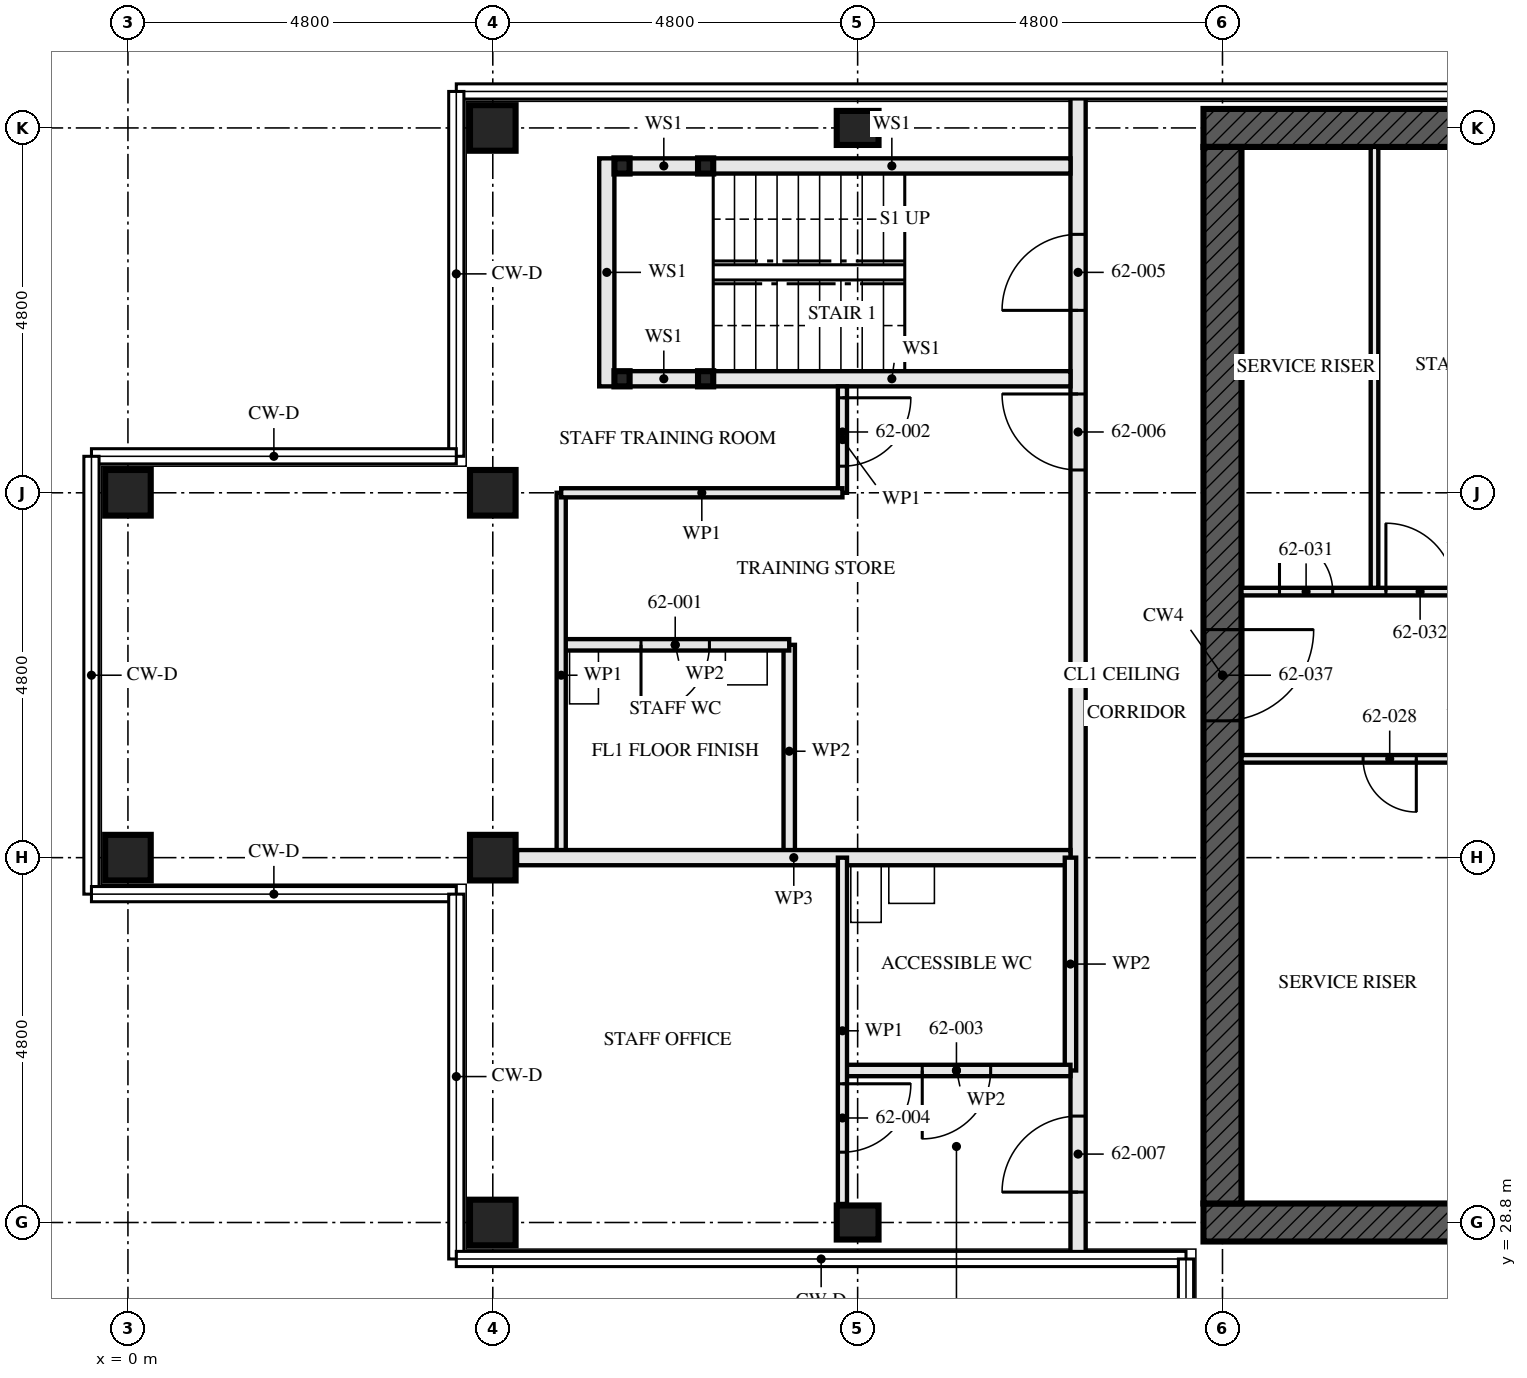
"""IFC4 building model, lengths in metres.
Left out: names, types, materials, properties, quantities, classifications, styles, units other than length and angle.
Written with IfcOpenShell. Run it as: python <this file> out.ifc"""

import sys

from ifc_helpers import new_model, si_unit, direction, frame, frame_2d, origin, origin_2d, place, context, subcontext, project, spatial, rectangle, hollow_rectangle, i_section, extrude, element, fill, save


model = new_model("IFC4")
c1 = context("Model", 3, precision=1e-05, world=origin(), true_north=direction((0.0, 1.0)))
c2 = subcontext(c1, "Body", "Model", "MODEL_VIEW")
j1 = project(units=[si_unit("LENGTHUNIT", "METRE"), si_unit("PLANEANGLEUNIT", "RADIAN")], contexts=[c1])
p1 = place(None, origin())
s1 = spatial("IfcSite", under=j1, at=p1, CompositionType="ELEMENT")
p2 = place(p1, origin())
s2 = spatial("IfcBuilding", under=s1, at=p2, CompositionType="ELEMENT")
p3 = place(p2, frame((0.0, 0.0, 226.0)))
s3 = spatial("IfcBuildingStorey", under=s2, at=p3, CompositionType="ELEMENT", Elevation=226.0)
for number, where, z_axis, x_axis in (
    (1, (0.0, 33.6, 0.0), (0.0, 0.0, 1.0), (0.0, 1.0, 0.0)),
    (2, (0.0, 38.4, 0.0), (0.0, 0.0, 1.0), (0.0, 1.0, 0.0)),
    (3, (4.8, 28.8, 0.0), (0.0, 0.0, 1.0), (0.0, 1.0, 0.0)),
    (4, (4.8, 33.6, 0.0), (0.0, 0.0, 1.0), (0.0, 1.0, 0.0)),
    (5, (4.8, 38.4, 0.0), (0.0, 0.0, 1.0), (0.0, 1.0, 0.0)),
    (6, (4.8, 43.2, 0.0), (0.0, 0.0, 1.0), (0.0, 1.0, 0.0)),
):
    element("IfcColumn", number, at=place(p3, frame(where, z_axis=z_axis, x_axis=x_axis)), inside=s3, PredefinedType="COLUMN", context=c2, shape_type="SweptSolid", body=[
        extrude(hollow_rectangle(XDim=0.6, YDim=0.6, WallThickness=0.05, at=origin_2d()), origin(), (0.0, 0.0, 1.0), 3.5),
    ])
for number, where, z_axis, x_axis in (
    (7, (9.6, 28.8, 0.0), (0.0, 0.0, 1.0), (0.0, 1.0, 0.0)),
    (8, (9.6, 43.2, 0.0), (0.0, 0.0, 1.0), (0.0, 1.0, 0.0)),
):
    element("IfcColumn", number, at=place(p3, frame(where, z_axis=z_axis, x_axis=x_axis)), inside=s3, PredefinedType="COLUMN", context=c2, shape_type="SweptSolid", body=[
        extrude(i_section(OverallWidth=0.448, OverallDepth=0.55, WebThickness=0.072, FlangeThickness=0.115, FilletRadius=0.015, at=origin_2d()), origin(), (0.0, 0.0, 1.0), 3.5),
    ])
p4 = place(p3, frame((14.15, 28.8, -0.17), z_axis=(0.0, 0.0, 1.0), x_axis=(1.0, 0.0, 0.0)))
e9 = element("IfcWall", 9, at=p4, inside=s3, PredefinedType="SHEAR", context=c2, shape_type="SweptSolid", body=[
    extrude(rectangle(XDim=14.9, YDim=0.5, at=frame_2d((7.45, 0.0))), origin(), (0.0, 0.0, 1.0), 3.5),
])
p5 = place(p4, frame((6.85, 0.0, 0.17)))
e10 = element("IfcOpeningElement", 10, at=p5, cuts=e9, PredefinedType="OPENING", context=c2, shape_type="SweptSolid", body=[
    extrude(rectangle(XDim=1.2, YDim=2.1, at=frame_2d((0.6, 1.05))), frame((0.0, 0.26, 0.0), z_axis=(0.0, -1.0, 0.0), x_axis=(1.0, 0.0, 0.0)), (0.0, 0.0, 1.0), 0.521),
])
p6 = place(p3, frame((29.05, 43.2, -0.17), z_axis=(0.0, 0.0, 1.0), x_axis=(-1.0, 0.0, 0.0)))
e11 = element("IfcWall", 11, at=p6, inside=s3, PredefinedType="SHEAR", context=c2, shape_type="SweptSolid", body=[
    extrude(rectangle(XDim=14.9, YDim=0.5, at=frame_2d((7.45, 0.0))), origin(), (0.0, 0.0, 1.0), 3.5),
])
p7 = place(p3, frame((14.4, 42.95, -0.17), z_axis=(0.0, 0.0, 1.0), x_axis=(0.0, -1.0, 0.0)))
e12 = element("IfcWall", 12, at=p7, inside=s3, PredefinedType="SHEAR", context=c2, shape_type="SweptSolid", body=[
    extrude(rectangle(XDim=13.9, YDim=0.5, at=frame_2d((6.95, 0.0))), origin(), (0.0, 0.0, 1.0), 3.5),
])
p8 = place(p7, frame((6.35, 0.0, 0.17)))
e13 = element("IfcOpeningElement", 13, at=p8, cuts=e12, PredefinedType="OPENING", context=c2, shape_type="SweptSolid", body=[
    extrude(rectangle(XDim=1.2, YDim=2.1, at=frame_2d((0.6, 1.05))), frame((0.0, 0.26, 0.0), z_axis=(0.0, -1.0, 0.0), x_axis=(1.0, 0.0, 0.0)), (0.0, 0.0, 1.0), 0.521),
])
for number, where, z_axis, x_axis in (
    (14, (6.5, 42.7, 0.0), (0.0, 0.0, 1.0), (1.0, 0.0, 0.0)),
    (15, (6.5, 39.9, 0.0), (0.0, 0.0, 1.0), (1.0, 0.0, 0.0)),
    (16, (7.6, 42.7, 0.0), (0.0, 0.0, 1.0), (1.0, 0.0, 0.0)),
    (17, (7.6, 39.9, 0.0), (0.0, 0.0, 1.0), (1.0, 0.0, 0.0)),
):
    element("IfcColumn", number, at=place(p3, frame(where, z_axis=z_axis, x_axis=x_axis)), inside=s3, PredefinedType="COLUMN", context=c2, shape_type="SweptSolid", body=[
        extrude(hollow_rectangle(XDim=0.2, YDim=0.2, WallThickness=0.008, at=origin_2d()), origin(), (0.0, 0.0, 1.0), 3.33),
    ])
p9 = place(p3, frame((6.6, 42.7, 0.0), z_axis=(0.0, 0.0, 1.0), x_axis=(1.0, 0.0, 0.0)))
e18 = element("IfcWall", 18, at=p9, inside=s3, PredefinedType="SOLIDWALL", context=c2, shape_type="SweptSolid", body=[
    extrude(rectangle(XDim=0.9, YDim=0.2, at=frame_2d((0.45, 0.0))), origin(), (0.0, 0.0, 1.0), 2.99),
])
p10 = place(p3, frame((7.7, 42.7, 0.0), z_axis=(0.0, 0.0, 1.0), x_axis=(1.0, 0.0, 0.0)))
e19 = element("IfcWall", 19, at=p10, inside=s3, PredefinedType="SOLIDWALL", context=c2, shape_type="SweptSolid", body=[
    extrude(rectangle(XDim=4.7, YDim=0.2, at=frame_2d((2.35, 0.0))), origin(), (0.0, 0.0, 1.0), 2.99),
])
p11 = place(p3, frame((6.6, 39.9, 0.0), z_axis=(0.0, 0.0, 1.0), x_axis=(1.0, 0.0, 0.0)))
e20 = element("IfcWall", 20, at=p11, inside=s3, PredefinedType="SOLIDWALL", context=c2, shape_type="SweptSolid", body=[
    extrude(rectangle(XDim=0.9, YDim=0.2, at=frame_2d((0.45, 0.0))), origin(), (0.0, 0.0, 1.0), 2.99),
])
p12 = place(p3, frame((7.7, 39.9, 0.0), z_axis=(0.0, 0.0, 1.0), x_axis=(1.0, 0.0, 0.0)))
e21 = element("IfcWall", 21, at=p12, inside=s3, PredefinedType="SOLIDWALL", context=c2, shape_type="SweptSolid", body=[
    extrude(rectangle(XDim=4.7, YDim=0.2, at=frame_2d((2.35, 0.0))), origin(), (0.0, 0.0, 1.0), 2.99),
])
p13 = place(p3, frame((6.3, 42.8, 0.0), z_axis=(0.0, 0.0, 1.0), x_axis=(0.0, -1.0, 0.0)))
e22 = element("IfcWall", 22, at=p13, inside=s3, PredefinedType="SOLIDWALL", context=c2, shape_type="SweptSolid", body=[
    extrude(rectangle(XDim=3.0, YDim=0.2, at=frame_2d((1.5, 0.0))), origin(), (0.0, 0.0, 1.0), 3.33),
])
p14 = place(p3, frame((5.7, 36.4, 0.0), z_axis=(0.0, 0.0, 1.0), x_axis=(1.0, 0.0, 0.0)))
e23 = element("IfcWall", 23, at=p14, inside=s3, PredefinedType="PARTITIONING", context=c2, shape_type="SweptSolid", body=[
    extrude(rectangle(XDim=3.0, YDim=0.15, at=frame_2d((1.5, 0.0))), origin(), (0.0, 0.0, 1.0), 3.33),
])
p15 = place(p14, frame((1.05, 0.0, 0.0)))
e24 = element("IfcOpeningElement", 24, at=p15, cuts=e23, PredefinedType="OPENING", context=c2, shape_type="SweptSolid", body=[
    extrude(rectangle(XDim=0.9, YDim=2.1, at=frame_2d((0.45, 1.05))), frame((0.0, 0.085, 0.0), z_axis=(0.0, -1.0, 0.0), x_axis=(1.0, 0.0, 0.0)), (0.0, 0.0, 1.0), 0.171),
])
p16 = place(p3, frame((8.7, 36.4, 0.0), z_axis=(0.0, 0.0, 1.0), x_axis=(0.0, -1.0, 0.0)))
e25 = element("IfcWall", 25, at=p16, inside=s3, PredefinedType="PARTITIONING", context=c2, shape_type="SweptSolid", body=[
    extrude(rectangle(XDim=2.8, YDim=0.15, at=frame_2d((1.4, 0.0))), origin(), (0.0, 0.0, 1.0), 3.33),
])
p17 = place(p3, frame((9.4, 39.8, 0.0), z_axis=(0.0, 0.0, 1.0), x_axis=(0.0, -1.0, 0.0)))
e26 = element("IfcWall", 26, at=p17, inside=s3, PredefinedType="PARTITIONING", context=c2, shape_type="SweptSolid", body=[
    extrude(rectangle(XDim=1.4, YDim=0.12, at=frame_2d((0.7, 0.0))), origin(), (0.0, 0.0, 1.0), 3.33),
])
p18 = place(p17, frame((0.15, 0.0, 0.0)))
e27 = element("IfcOpeningElement", 27, at=p18, cuts=e26, PredefinedType="OPENING", context=c2, shape_type="SweptSolid", body=[
    extrude(rectangle(XDim=0.9, YDim=2.1, at=frame_2d((0.45, 1.05))), frame((0.0, 0.071, 0.0), z_axis=(0.0, -1.0, 0.0), x_axis=(1.0, 0.0, 0.0)), (0.0, 0.0, 1.0), 0.141),
])
p19 = place(p3, frame((5.7, 38.4, 0.0), z_axis=(0.0, 0.0, 1.0), x_axis=(0.0, -1.0, 0.0)))
e28 = element("IfcWall", 28, at=p19, inside=s3, PredefinedType="PARTITIONING", context=c2, shape_type="SweptSolid", body=[
    extrude(rectangle(XDim=4.8, YDim=0.12, at=frame_2d((2.4, 0.0))), origin(), (0.0, 0.0, 1.0), 3.33),
])
p20 = place(p3, frame((5.7, 38.4, 0.0), z_axis=(0.0, 0.0, 1.0), x_axis=(1.0, 0.0, 0.0)))
e29 = element("IfcWall", 29, at=p20, inside=s3, PredefinedType="PARTITIONING", context=c2, shape_type="SweptSolid", body=[
    extrude(rectangle(XDim=3.7, YDim=0.12, at=frame_2d((1.85, 0.0))), origin(), (0.0, 0.0, 1.0), 2.55),
])
p21 = place(p3, frame((5.12, 33.6, 0.0), z_axis=(0.0, 0.0, 1.0), x_axis=(1.0, 0.0, 0.0)))
e30 = element("IfcWall", 30, at=p21, inside=s3, PredefinedType="PARTITIONING", context=c2, shape_type="SweptSolid", body=[
    extrude(rectangle(XDim=7.28, YDim=0.2, at=frame_2d((3.64, 0.0))), origin(), (0.0, 0.0, 1.0), 2.55),
])
p22 = place(p3, frame((9.4, 30.8, 0.0), z_axis=(0.0, 0.0, 1.0), x_axis=(1.0, 0.0, 0.0)))
e31 = element("IfcWall", 31, at=p22, inside=s3, PredefinedType="PARTITIONING", context=c2, shape_type="SweptSolid", body=[
    extrude(rectangle(XDim=3.0, YDim=0.15, at=frame_2d((1.5, 0.0))), origin(), (0.0, 0.0, 1.0), 3.33),
])
p23 = place(p22, frame((1.05, 0.0, 0.0)))
e32 = element("IfcOpeningElement", 32, at=p23, cuts=e31, PredefinedType="OPENING", context=c2, shape_type="SweptSolid", body=[
    extrude(rectangle(XDim=0.9, YDim=2.1, at=frame_2d((0.45, 1.05))), frame((0.0, 0.085, 0.0), z_axis=(0.0, -1.0, 0.0), x_axis=(1.0, 0.0, 0.0)), (0.0, 0.0, 1.0), 0.171),
])
p24 = place(p3, frame((12.4, 33.6, 0.0), z_axis=(0.0, 0.0, 1.0), x_axis=(0.0, -1.0, 0.0)))
e33 = element("IfcWall", 33, at=p24, inside=s3, PredefinedType="PARTITIONING", context=c2, shape_type="SweptSolid", body=[
    extrude(rectangle(XDim=2.8, YDim=0.15, at=frame_2d((1.4, 0.0))), origin(), (0.0, 0.0, 1.0), 3.33),
])
p25 = place(p3, frame((9.4, 33.6, 0.0), z_axis=(0.0, 0.0, 1.0), x_axis=(0.0, -1.0, 0.0)))
e34 = element("IfcWall", 34, at=p25, inside=s3, PredefinedType="PARTITIONING", context=c2, shape_type="SweptSolid", body=[
    extrude(rectangle(XDim=4.556, YDim=0.12, at=frame_2d((2.278, 0.0))), origin(), (0.0, 0.0, 1.0), 3.33),
])
p26 = place(p25, frame((2.975, 0.0, 0.0)))
e35 = element("IfcOpeningElement", 35, at=p26, cuts=e34, PredefinedType="OPENING", context=c2, shape_type="SweptSolid", body=[
    extrude(rectangle(XDim=0.9, YDim=2.1, at=frame_2d((0.45, 1.05))), frame((0.0, 0.071, 0.0), z_axis=(0.0, -1.0, 0.0), x_axis=(1.0, 0.0, 0.0)), (0.0, 0.0, 1.0), 0.141),
])
p27 = place(p3, frame((12.5, 43.655, 0.0), z_axis=(0.0, 0.0, 1.0), x_axis=(0.0, -1.0, 0.0)))
e36 = element("IfcWall", 36, at=p27, inside=s3, PredefinedType="PARTITIONING", context=c2, shape_type="SweptSolid", body=[
    extrude(rectangle(XDim=15.31, YDim=0.2, at=frame_2d((7.655, 0.0))), origin(), (0.0, 0.0, 1.0), 2.32),
])
p28 = place(p27, frame((1.855, 0.0, 0.0)))
e37 = element("IfcOpeningElement", 37, at=p28, cuts=e36, PredefinedType="OPENING", context=c2, shape_type="SweptSolid", body=[
    extrude(rectangle(XDim=1.0, YDim=2.1, at=frame_2d((0.5, 1.05))), frame((0.0, 0.111, 0.0), z_axis=(0.0, -1.0, 0.0), x_axis=(1.0, 0.0, 0.0)), (0.0, 0.0, 1.0), 0.221),
])
p29 = place(p27, frame((3.955, 0.0, 0.0)))
e38 = element("IfcOpeningElement", 38, at=p29, cuts=e36, PredefinedType="OPENING", context=c2, shape_type="SweptSolid", body=[
    extrude(rectangle(XDim=1.0, YDim=2.1, at=frame_2d((0.5, 1.05))), frame((0.0, 0.111, 0.0), z_axis=(0.0, -1.0, 0.0), x_axis=(1.0, 0.0, 0.0)), (0.0, 0.0, 1.0), 0.221),
])
p30 = place(p27, frame((13.455, 0.0, 0.0)))
e39 = element("IfcOpeningElement", 39, at=p30, cuts=e36, PredefinedType="OPENING", context=c2, shape_type="SweptSolid", body=[
    extrude(rectangle(XDim=1.0, YDim=2.1, at=frame_2d((0.5, 1.05))), frame((0.0, 0.111, 0.0), z_axis=(0.0, -1.0, 0.0), x_axis=(1.0, 0.0, 0.0)), (0.0, 0.0, 1.0), 0.221),
])
p31 = place(p3, frame((16.4, 37.15, 0.0), z_axis=(0.0, 0.0, 1.0), x_axis=(0.0, 1.0, 0.0)))
e40 = element("IfcWall", 40, at=p31, inside=s3, PredefinedType="SOLIDWALL", context=c2, shape_type="SweptSolid", body=[
    extrude(rectangle(XDim=5.8, YDim=0.1, at=frame_2d((2.9, 0.0))), origin(), (0.0, 0.0, 1.0), 3.33),
])
p32 = place(p3, frame((14.65, 34.9, 0.0), z_axis=(0.0, 0.0, 1.0), x_axis=(1.0, 0.0, 0.0)))
e41 = element("IfcWall", 41, at=p32, inside=s3, PredefinedType="SOLIDWALL", context=c2, shape_type="SweptSolid", body=[
    extrude(rectangle(XDim=5.9, YDim=0.1, at=frame_2d((2.95, 0.0))), origin(), (0.0, 0.0, 1.0), 3.33),
])
p33 = place(p32, frame((1.6, 0.0, 0.0)))
e42 = element("IfcOpeningElement", 42, at=p33, cuts=e41, PredefinedType="OPENING", context=c2, shape_type="SweptSolid", body=[
    extrude(rectangle(XDim=0.7, YDim=2.1, at=frame_2d((0.35, 1.05))), frame((0.0, 0.061, 0.0), z_axis=(0.0, -1.0, 0.0), x_axis=(1.0, 0.0, 0.0)), (0.0, 0.0, 1.0), 0.121),
])
p34 = place(p3, frame((14.65, 37.1, 0.0), z_axis=(0.0, 0.0, 1.0), x_axis=(1.0, 0.0, 0.0)))
e43 = element("IfcWall", 43, at=p34, inside=s3, PredefinedType="SOLIDWALL", context=c2, shape_type="SweptSolid", body=[
    extrude(rectangle(XDim=5.9, YDim=0.1, at=frame_2d((2.95, 0.0))), origin(), (0.0, 0.0, 1.0), 3.33),
])
p35 = place(p34, frame((0.5, 0.0, 0.0)))
e44 = element("IfcOpeningElement", 44, at=p35, cuts=e43, PredefinedType="OPENING", context=c2, shape_type="SweptSolid", body=[
    extrude(rectangle(XDim=0.7, YDim=2.1, at=frame_2d((0.35, 1.05))), frame((0.0, 0.061, 0.0), z_axis=(0.0, -1.0, 0.0), x_axis=(1.0, 0.0, 0.0)), (0.0, 0.0, 1.0), 0.121),
])
p36 = place(p34, frame((1.9, 0.0, 0.0)))
e45 = element("IfcOpeningElement", 45, at=p36, cuts=e43, PredefinedType="OPENING", context=c2, shape_type="SweptSolid", body=[
    extrude(rectangle(XDim=0.9, YDim=2.1, at=frame_2d((0.45, 1.05))), frame((0.0, 0.061, 0.0), z_axis=(0.0, -1.0, 0.0), x_axis=(1.0, 0.0, 0.0)), (0.0, 0.0, 1.0), 0.121),
])
p37 = place(p15, frame((0.9, 0.0, 0.0), z_axis=(0.0, 0.0, 1.0), x_axis=(-1.0, 0.0, 0.0)))
e46 = element("IfcDoor", 46, at=p37, inside=s3, OperationType="SINGLE_SWING_LEFT", PredefinedType="DOOR", context=c2, shape_type="SweptSolid", body=[
    extrude(rectangle(XDim=0.9, YDim=2.1, at=frame_2d((0.45, 1.05))), frame((0.0, 0.022, 0.0), z_axis=(0.0, -1.0, 0.0), x_axis=(1.0, 0.0, 0.0)), (0.0, 0.0, 1.0), 0.044),
])
fill(e24, e46)
p38 = place(p18, origin())
e47 = element("IfcDoor", 47, at=p38, inside=s3, OperationType="SINGLE_SWING_RIGHT", PredefinedType="DOOR", context=c2, shape_type="SweptSolid", body=[
    extrude(rectangle(XDim=0.9, YDim=2.1, at=frame_2d((0.45, 1.05))), frame((0.0, 0.022, 0.0), z_axis=(0.0, -1.0, 0.0), x_axis=(1.0, 0.0, 0.0)), (0.0, 0.0, 1.0), 0.044),
])
fill(e27, e47)
p39 = place(p23, frame((0.9, 0.0, 0.0), z_axis=(0.0, 0.0, 1.0), x_axis=(-1.0, 0.0, 0.0)))
e48 = element("IfcDoor", 48, at=p39, inside=s3, OperationType="SINGLE_SWING_LEFT", PredefinedType="DOOR", context=c2, shape_type="SweptSolid", body=[
    extrude(rectangle(XDim=0.9, YDim=2.1, at=frame_2d((0.45, 1.05))), frame((0.0, 0.022, 0.0), z_axis=(0.0, -1.0, 0.0), x_axis=(1.0, 0.0, 0.0)), (0.0, 0.0, 1.0), 0.044),
])
fill(e32, e48)
p40 = place(p26, origin())
e49 = element("IfcDoor", 49, at=p40, inside=s3, OperationType="SINGLE_SWING_RIGHT", PredefinedType="DOOR", context=c2, shape_type="SweptSolid", body=[
    extrude(rectangle(XDim=0.9, YDim=2.1, at=frame_2d((0.45, 1.05))), frame((0.0, 0.022, 0.0), z_axis=(0.0, -1.0, 0.0), x_axis=(1.0, 0.0, 0.0)), (0.0, 0.0, 1.0), 0.044),
])
fill(e35, e49)
p41 = place(p28, frame((1.0, 0.0, 0.0), z_axis=(0.0, 0.0, 1.0), x_axis=(-1.0, 0.0, 0.0)))
e50 = element("IfcDoor", 50, at=p41, inside=s3, OperationType="SINGLE_SWING_RIGHT", PredefinedType="DOOR", context=c2, shape_type="SweptSolid", body=[
    extrude(rectangle(XDim=1.0, YDim=2.1, at=frame_2d((0.5, 1.05))), frame((0.0, 0.032, 0.0), z_axis=(0.0, -1.0, 0.0), x_axis=(1.0, 0.0, 0.0)), (0.0, 0.0, 1.0), 0.064),
])
fill(e37, e50)
p42 = place(p29, frame((1.0, 0.0, 0.0), z_axis=(0.0, 0.0, 1.0), x_axis=(-1.0, 0.0, 0.0)))
e51 = element("IfcDoor", 51, at=p42, inside=s3, OperationType="SINGLE_SWING_LEFT", PredefinedType="DOOR", context=c2, shape_type="SweptSolid", body=[
    extrude(rectangle(XDim=1.0, YDim=2.1, at=frame_2d((0.5, 1.05))), frame((0.0, 0.027, 0.0), z_axis=(0.0, -1.0, 0.0), x_axis=(1.0, 0.0, 0.0)), (0.0, 0.0, 1.0), 0.054),
])
fill(e38, e51)
p43 = place(p30, frame((1.0, 0.0, 0.0), z_axis=(0.0, 0.0, 1.0), x_axis=(-1.0, 0.0, 0.0)))
e52 = element("IfcDoor", 52, at=p43, inside=s3, OperationType="SINGLE_SWING_RIGHT", PredefinedType="DOOR", context=c2, shape_type="SweptSolid", body=[
    extrude(rectangle(XDim=1.0, YDim=2.1, at=frame_2d((0.5, 1.05))), frame((0.0, 0.027, 0.0), z_axis=(0.0, -1.0, 0.0), x_axis=(1.0, 0.0, 0.0)), (0.0, 0.0, 1.0), 0.054),
])
fill(e39, e52)
p44 = place(p33, frame((0.7, 0.0, 0.0), z_axis=(0.0, 0.0, 1.0), x_axis=(-1.0, 0.0, 0.0)))
e53 = element("IfcDoor", 53, at=p44, inside=s3, OperationType="SINGLE_SWING_RIGHT", PredefinedType="DOOR", context=c2, shape_type="SweptSolid", body=[
    extrude(rectangle(XDim=0.7, YDim=2.1, at=frame_2d((0.35, 1.05))), frame((0.0, 0.027, 0.0), z_axis=(0.0, -1.0, 0.0), x_axis=(1.0, 0.0, 0.0)), (0.0, 0.0, 1.0), 0.054),
])
fill(e42, e53)
p45 = place(p35, origin())
e54 = element("IfcDoor", 54, at=p45, inside=s3, OperationType="SINGLE_SWING_RIGHT", PredefinedType="DOOR", context=c2, shape_type="SweptSolid", body=[
    extrude(rectangle(XDim=0.7, YDim=2.1, at=frame_2d((0.35, 1.05))), frame((0.0, 0.027, 0.0), z_axis=(0.0, -1.0, 0.0), x_axis=(1.0, 0.0, 0.0)), (0.0, 0.0, 1.0), 0.054),
])
fill(e44, e54)
p46 = place(p36, origin())
e55 = element("IfcDoor", 55, at=p46, inside=s3, OperationType="SINGLE_SWING_RIGHT", PredefinedType="DOOR", context=c2, shape_type="SweptSolid", body=[
    extrude(rectangle(XDim=0.9, YDim=2.1, at=frame_2d((0.45, 1.05))), frame((0.0, 0.027, 0.0), z_axis=(0.0, -1.0, 0.0), x_axis=(1.0, 0.0, 0.0)), (0.0, 0.0, 1.0), 0.054),
])
fill(e45, e55)
p47 = place(p8, origin())
e56 = element("IfcDoor", 56, at=p47, inside=s3, OperationType="SINGLE_SWING_LEFT", PredefinedType="DOOR", context=c2, shape_type="SweptSolid", body=[
    extrude(rectangle(XDim=1.2, YDim=2.1, at=frame_2d((0.6, 1.05))), frame((0.0, 0.027, 0.0), z_axis=(0.0, -1.0, 0.0), x_axis=(1.0, 0.0, 0.0)), (0.0, 0.0, 1.0), 0.054),
])
fill(e13, e56)
save(model, sys.argv[1])
